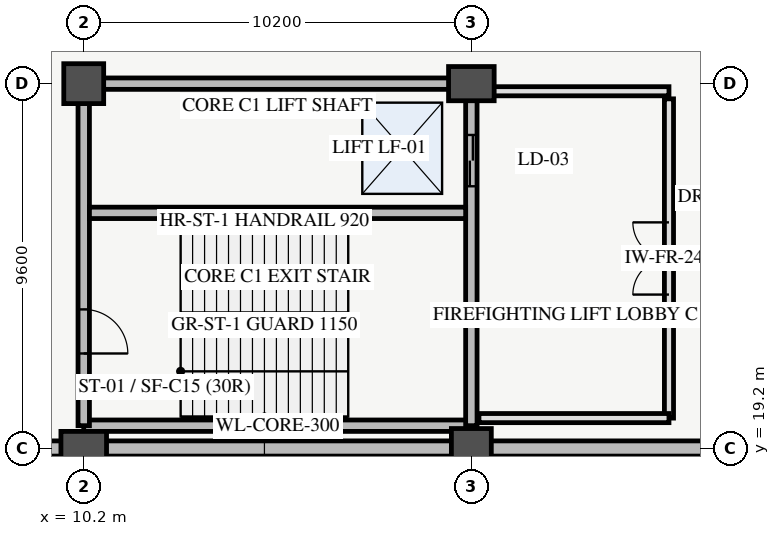
"""IFC4 building model, lengths in metres.
Left out: names, types, materials, properties, quantities, classifications, styles, units other than length and angle.
Written with IfcOpenShell. Run it as: python <this file> out.ifc"""

import sys

from ifc_helpers import new_model, si_unit, direction, frame, frame_2d, origin, origin_2d, place, context, subcontext, project, spatial, rectangle, extrude, element, fill, save


model = new_model("IFC4")
c1 = context("Model", 3, precision=1e-05, world=origin(), true_north=direction((0.0, 1.0)))
c2 = subcontext(c1, "Body", "Model", "MODEL_VIEW")
j1 = project(units=[si_unit("LENGTHUNIT", "METRE"), si_unit("PLANEANGLEUNIT", "RADIAN")], contexts=[c1])
p1 = place(None, origin())
s1 = spatial("IfcSite", under=j1, at=p1, CompositionType="ELEMENT")
p2 = place(p1, origin())
s2 = spatial("IfcBuilding", under=s1, at=p2, CompositionType="ELEMENT")
p3 = place(p2, frame((0.0, 0.0, -4.5)))
s3 = spatial("IfcBuildingStorey", under=s2, at=p3, CompositionType="ELEMENT", Elevation=-4.5)
p4 = place(p3, frame((10.2, 19.2, 0.0), z_axis=(0.0, 0.0, 1.0), x_axis=(1.0, 0.0, 0.0)))
e1 = element("IfcColumn", 1, at=p4, inside=s3, PredefinedType="COLUMN", context=c2, shape_type="SweptSolid", body=[
    extrude(rectangle(XDim=1.2, YDim=0.9, at=origin_2d()), origin(), (0.0, 0.0, 1.0), 4.5),
])
for number, where, z_axis, x_axis in (
    (2, (10.2, 28.8, 0.0), (0.0, 0.0, 1.0), (1.0, 0.0, 0.0)),
    (3, (20.4, 19.2, 0.0), (0.0, 0.0, 1.0), (1.0, 0.0, 0.0)),
):
    element("IfcColumn", number, at=place(p3, frame(where, z_axis=z_axis, x_axis=x_axis)), inside=s3, PredefinedType="COLUMN", context=c2, shape_type="SweptSolid", body=[
        extrude(rectangle(XDim=1.05, YDim=1.05, at=origin_2d()), origin(), (0.0, 0.0, 1.0), 4.5),
    ])
p5 = place(p3, frame((20.4, 28.8, 0.0), z_axis=(0.0, 0.0, 1.0), x_axis=(1.0, 0.0, 0.0)))
e4 = element("IfcColumn", 4, at=p5, inside=s3, PredefinedType="COLUMN", context=c2, shape_type="SweptSolid", body=[
    extrude(rectangle(XDim=1.2, YDim=0.9, at=origin_2d()), origin(), (0.0, 0.0, 1.0), 4.5),
])
for number, where, z_axis, x_axis in (
    (5, (10.2, 19.8, 0.0), (0.0, 0.0, 1.0), (1.0, 0.0, 0.0)),
    (6, (10.2, 28.8, 0.0), (0.0, 0.0, 1.0), (1.0, 0.0, 0.0)),
):
    element("IfcWall", number, at=place(p3, frame(where, z_axis=z_axis, x_axis=x_axis)), inside=s3, PredefinedType="SHEAR", context=c2, shape_type="SweptSolid", body=[
        extrude(rectangle(XDim=10.2, YDim=0.3, at=frame_2d((5.1, 0.0))), origin(), (0.0, 0.0, 1.0), 4.5),
    ])
p6 = place(p3, frame((10.2, 19.8, 0.0), z_axis=(0.0, 0.0, 1.0), x_axis=(0.0, 1.0, 0.0)))
e7 = element("IfcWall", 7, at=p6, inside=s3, PredefinedType="SHEAR", context=c2, shape_type="SweptSolid", body=[
    extrude(rectangle(XDim=9.0, YDim=0.3, at=frame_2d((4.5, 0.0))), origin(), (0.0, 0.0, 1.0), 4.5),
])
p7 = place(p6, frame((1.9, 0.0, 0.0)))
e8 = element("IfcOpeningElement", 8, at=p7, cuts=e7, PredefinedType="OPENING", context=c2, shape_type="SweptSolid", body=[
    extrude(rectangle(XDim=1.16, YDim=2.2, at=frame_2d((0.58, 1.1))), frame((0.0, 0.16, 0.0), z_axis=(0.0, -1.0, 0.0), x_axis=(1.0, 0.0, 0.0)), (0.0, 0.0, 1.0), 0.32),
])
p8 = place(p3, frame((20.4, 19.8, 0.0), z_axis=(0.0, 0.0, 1.0), x_axis=(0.0, 1.0, 0.0)))
e9 = element("IfcWall", 9, at=p8, inside=s3, PredefinedType="SHEAR", context=c2, shape_type="SweptSolid", body=[
    extrude(rectangle(XDim=9.0, YDim=0.3, at=frame_2d((4.5, 0.0))), origin(), (0.0, 0.0, 1.0), 4.5),
])
p9 = place(p8, frame((6.3, 0.0, 0.0)))
e10 = element("IfcOpeningElement", 10, at=p9, cuts=e9, PredefinedType="OPENING", context=c2, shape_type="SweptSolid", body=[
    extrude(rectangle(XDim=1.35, YDim=2.3, at=frame_2d((0.675, 1.15))), frame((0.0, 0.16, 0.0), z_axis=(0.0, -1.0, 0.0), x_axis=(1.0, 0.0, 0.0)), (0.0, 0.0, 1.0), 0.32),
])
p10 = place(p3, frame((0.0, 19.2, 0.0), z_axis=(0.0, 0.0, 1.0), x_axis=(1.0, 0.0, 0.0)))
e11 = element("IfcWall", 11, at=p10, inside=s3, PredefinedType="SOLIDWALL", context=c2, shape_type="SweptSolid", body=[
    extrude(rectangle(XDim=102.0, YDim=0.4, at=frame_2d((51.0, 0.0))), origin(), (0.0, 0.0, 1.0), 4.1),
])
p11 = place(p3, frame((10.35, 25.4, 0.0), z_axis=(0.0, 0.0, 1.0), x_axis=(1.0, 0.0, 0.0)))
e12 = element("IfcWall", 12, at=p11, inside=s3, PredefinedType="SHEAR", context=c2, shape_type="SweptSolid", body=[
    extrude(rectangle(XDim=9.9, YDim=0.3, at=frame_2d((4.95, 0.0))), origin(), (0.0, 0.0, 1.0), 4.5),
])
p12 = place(p3, frame((25.6, 20.0, 0.0), z_axis=(0.0, 0.0, 1.0), x_axis=(0.0, 1.0, 0.0)))
e13 = element("IfcWall", 13, at=p12, inside=s3, PredefinedType="PARTITIONING", context=c2, shape_type="SweptSolid", body=[
    extrude(rectangle(XDim=8.4, YDim=0.24, at=frame_2d((4.2, 0.0))), origin(), (0.0, 0.0, 1.0), 2.75),
])
p13 = place(p12, frame((3.25, 0.0, 0.0)))
e14 = element("IfcOpeningElement", 14, at=p13, cuts=e13, PredefinedType="OPENING", context=c2, shape_type="SweptSolid", body=[
    extrude(rectangle(XDim=1.9, YDim=2.25, at=frame_2d((0.95, 1.125))), frame((0.0, 0.13, 0.0), z_axis=(0.0, -1.0, 0.0), x_axis=(1.0, 0.0, 0.0)), (0.0, 0.0, 1.0), 0.26),
])
for number, where, z_axis, x_axis in (
    (15, (20.6, 28.6, 0.0), (0.0, 0.0, 1.0), (1.0, 0.0, 0.0)),
    (16, (20.6, 20.0, 0.0), (0.0, 0.0, 1.0), (1.0, 0.0, 0.0)),
):
    element("IfcWall", number, at=place(p3, frame(where, z_axis=z_axis, x_axis=x_axis)), inside=s3, PredefinedType="PARTITIONING", context=c2, shape_type="SweptSolid", body=[
        extrude(rectangle(XDim=5.0, YDim=0.24, at=frame_2d((2.5, 0.0))), origin(), (0.0, 0.0, 1.0), 2.75),
    ])
p14 = place(p7, origin())
e17 = element("IfcDoor", 17, at=p14, inside=s3, OperationType="SINGLE_SWING_LEFT", PredefinedType="DOOR", context=c2, shape_type="SweptSolid", body=[
    extrude(rectangle(XDim=1.16, YDim=2.2, at=frame_2d((0.58, 1.1))), frame((0.0, 0.025, 0.0), z_axis=(0.0, -1.0, 0.0), x_axis=(1.0, 0.0, 0.0)), (0.0, 0.0, 1.0), 0.05),
])
fill(e8, e17)
p15 = place(p9, origin())
e18 = element("IfcDoor", 18, at=p15, inside=s3, OperationType="DOUBLE_DOOR_SLIDING", PredefinedType="DOOR", context=c2, shape_type="SweptSolid", body=[
    extrude(rectangle(XDim=1.35, YDim=2.3, at=frame_2d((0.675, 1.15))), frame((0.0, 0.025, 0.0), z_axis=(0.0, -1.0, 0.0), x_axis=(1.0, 0.0, 0.0)), (0.0, 0.0, 1.0), 0.05),
])
fill(e10, e18)
p16 = place(p13, origin())
e19 = element("IfcDoor", 19, at=p16, inside=s3, OperationType="DOUBLE_DOOR_SINGLE_SWING", PredefinedType="DOOR", context=c2, shape_type="SweptSolid", body=[
    extrude(rectangle(XDim=1.9, YDim=2.25, at=frame_2d((0.95, 1.125))), frame((0.0, 0.025, 0.0), z_axis=(0.0, -1.0, 0.0), x_axis=(1.0, 0.0, 0.0)), (0.0, 0.0, 1.0), 0.05),
])
fill(e14, e19)
save(model, sys.argv[1])
